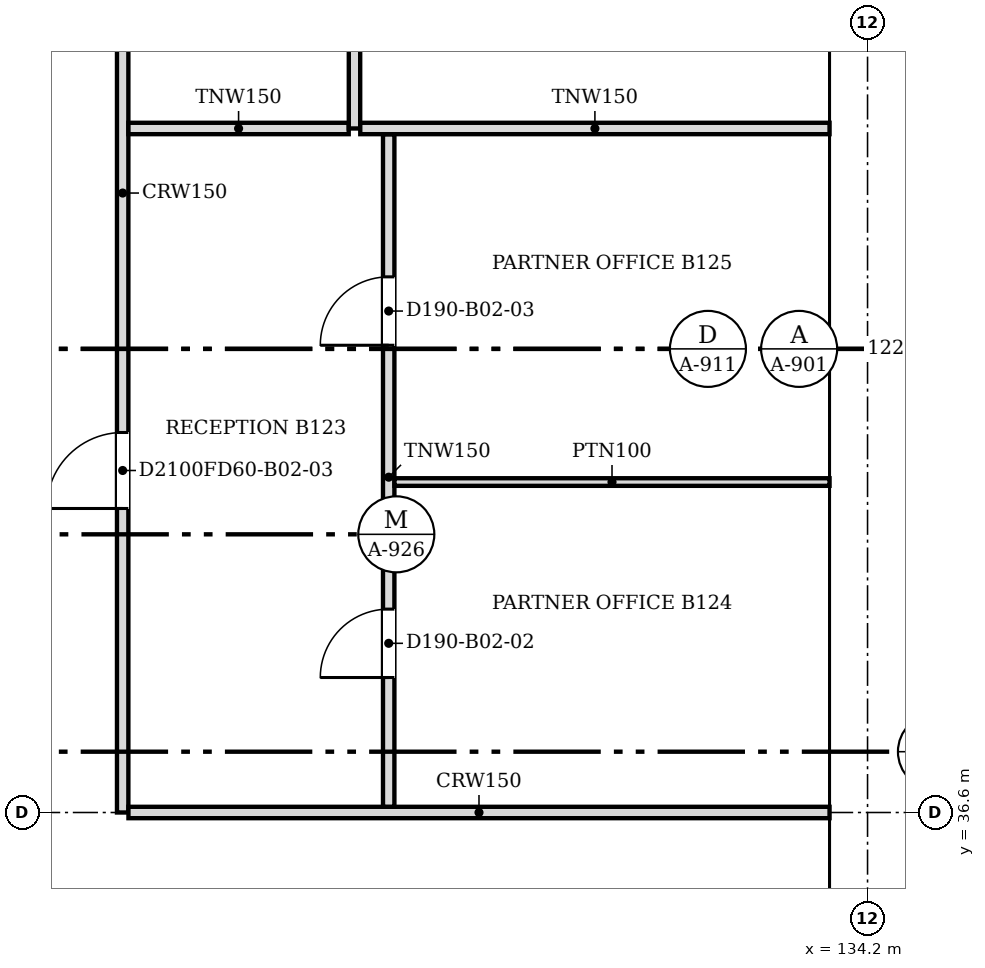
"""IFC4 building model, lengths in metres.
Left out: names, types, materials, properties, quantities, classifications, styles, units other than length and angle.
Written with IfcOpenShell. Run it as: python <this file> out.ifc"""

import sys

from ifc_helpers import new_model, si_unit, direction, frame, frame_2d, origin, place, context, subcontext, project, spatial, polyline, rectangle, outline, extrude, faceted_brep, source, transform, mapped, element, fill, save


model = new_model("IFC4")
c1 = context("Model", 3, precision=1e-05, world=origin(), true_north=direction((0.0, 1.0)))
c2 = subcontext(c1, "Body", "Model", "MODEL_VIEW")
j1 = project(units=[si_unit("LENGTHUNIT", "METRE"), si_unit("PLANEANGLEUNIT", "RADIAN")], contexts=[c1])
p1 = place(None, origin())
s1 = spatial("IfcSite", under=j1, at=p1, CompositionType="ELEMENT")
p2 = place(p1, origin())
s2 = spatial("IfcBuilding", under=s1, at=p2, CompositionType="ELEMENT")
p3 = place(p2, frame((0.0, 0.0, 21.3)))
s3 = spatial("IfcBuildingStorey", under=s2, at=p3, CompositionType="ELEMENT", Elevation=21.3)
m1 = source(origin(), c2, "Body", "Brep", [
    faceted_brep([(3.05, -0.25, 0.0), (6.1, -0.25, 4.5), (6.1, -0.25, 4.5), (3.05, -0.25, 9.0), (0.0, -0.25, 4.5), (0.0, 0.25, 4.5), (3.05, 0.25, 9.0), (6.1, 0.25, 4.5), (6.1, 0.25, 4.5), (3.05, 0.25, 0.0)], [[[0, 1, 2, 3, 4]], [[5, 6, 7, 8, 9]], [[9, 8, 1, 0]], [[7, 6, 3, 2]], [[6, 5, 4, 3]], [[5, 9, 0, 4]], [[1, 8, 7, 2]]]),
])
p4 = place(p3, frame((133.95, 33.55, -4.5), z_axis=(0.0, 0.0, 1.0), x_axis=(0.0, 1.0, 0.0)))
e1 = element("IfcWall", 1, at=p4, inside=s3, PredefinedType="SOLIDWALL", context=c2, shape_type="MappedRepresentation", body=[
    mapped(m1, transform((0.0, 0.0, 0.0), scale=1.0)),
])
m2 = source(origin(), c2, "Body", "SweptSolid", [
    extrude(outline(polyline([(3.05, 0.446), (5.798, 4.5), (3.05, 8.554), (0.302, 4.5), (3.05, 0.446)])), frame((0.0, 0.26, 0.0), z_axis=(0.0, -1.0, 0.0), x_axis=(1.0, 0.0, 0.0)), (0.0, 0.0, 1.0), 0.52),
])
p5 = place(p4, origin())
e2 = element("IfcOpeningElement", 2, at=p5, cuts=e1, PredefinedType="OPENING", context=c2, shape_type="MappedRepresentation", body=[
    mapped(m2, transform((0.0, 0.0, 0.0), scale=1.0)),
])
m3 = source(origin(), c2, "Body", "SweptSolid", [
    extrude(outline(polyline([(3.05, 0.0), (6.1, 4.5), (3.05, 9.0), (0.0, 4.5), (3.05, 0.0)])), frame((0.0, 0.25, 0.0), z_axis=(0.0, -1.0, 0.0), x_axis=(1.0, 0.0, 0.0)), (0.0, 0.0, 1.0), 0.5),
])
p6 = place(p3, frame((133.95, 39.65, -4.5), z_axis=(0.0, 0.0, 1.0), x_axis=(0.0, 1.0, 0.0)))
e3 = element("IfcWall", 3, at=p6, inside=s3, PredefinedType="SOLIDWALL", context=c2, shape_type="MappedRepresentation", body=[
    mapped(m3, transform((0.0, 0.0, 0.0), scale=1.0)),
])
p7 = place(p6, origin())
e4 = element("IfcOpeningElement", 4, at=p7, cuts=e3, PredefinedType="OPENING", context=c2, shape_type="MappedRepresentation", body=[
    mapped(m2, transform((0.0, 0.0, 0.0), scale=1.0)),
])
m4 = source(origin(), c2, "Body", "Brep", [
    faceted_brep([(3.003, -0.25, 0.0), (3.05, -0.25, 0.071), (3.05, -0.25, 8.929), (3.003, -0.25, 9.0), (0.0, -0.25, 4.5), (0.0, 0.25, 4.5), (2.957, 0.25, 8.93), (2.957, 0.25, 0.07), (3.003, 0.0, 0.0), (3.003, 0.0, 9.0)], [[[0, 1, 2, 3, 4]], [[5, 6, 7]], [[1, 0, 8]], [[9, 3, 2]], [[6, 5, 4, 3, 9]], [[5, 7, 8, 0, 4]], [[1, 8, 7, 6, 9, 2]]]),
])
p8 = place(p3, frame((133.95, 45.75, -4.5), z_axis=(0.0, 0.0, 1.0), x_axis=(0.0, 1.0, 0.0)))
e5 = element("IfcWall", 5, at=p8, inside=s3, PredefinedType="SOLIDWALL", context=c2, shape_type="MappedRepresentation", body=[
    mapped(m4, transform((0.0, 0.0, 0.0), scale=1.0)),
])
m5 = source(origin(), c2, "Body", "SweptSolid", [
    extrude(outline(polyline([(2.803, 8.25), (0.301, 4.5), (2.803, 0.75), (2.803, 8.25)])), frame((0.0, 0.26, 0.0), z_axis=(0.0, -1.0, 0.0), x_axis=(1.0, 0.0, 0.0)), (0.0, 0.0, 1.0), 0.52),
])
p9 = place(p8, origin())
e6 = element("IfcOpeningElement", 6, at=p9, cuts=e5, PredefinedType="OPENING", context=c2, shape_type="MappedRepresentation", body=[
    mapped(m5, transform((0.0, 0.0, 0.0), scale=1.0)),
])
m6 = source(origin(), c2, "Body", "SweptSolid", [
    extrude(outline(polyline([(3.05, 0.0), (6.1, 4.5), (0.0, 4.5), (3.05, 0.0)])), frame((0.0, 0.25, 0.0), z_axis=(0.0, -1.0, 0.0), x_axis=(1.0, 0.0, 0.0)), (0.0, 0.0, 1.0), 0.5),
])
p10 = place(p3, frame((133.95, 30.5, 0.0), z_axis=(0.0, 0.0, 1.0), x_axis=(0.0, 1.0, 0.0)))
e7 = element("IfcWall", 7, at=p10, inside=s3, PredefinedType="SOLIDWALL", context=c2, shape_type="MappedRepresentation", body=[
    mapped(m6, transform((0.0, 0.0, 0.0), scale=1.0)),
])
m7 = source(origin(), c2, "Body", "SweptSolid", [
    extrude(outline(polyline([(3.05, 0.446), (5.629, 4.25), (0.471, 4.25), (3.05, 0.446)])), frame((0.0, 0.26, 0.0), z_axis=(0.0, -1.0, 0.0), x_axis=(1.0, 0.0, 0.0)), (0.0, 0.0, 1.0), 0.52),
])
p11 = place(p10, origin())
e8 = element("IfcOpeningElement", 8, at=p11, cuts=e7, PredefinedType="OPENING", context=c2, shape_type="MappedRepresentation", body=[
    mapped(m7, transform((0.0, 0.0, 0.0), scale=1.0)),
])
m8 = source(origin(), c2, "Body", "Brep", [
    faceted_brep([(3.05, -0.25, 0.0), (6.1, -0.25, 4.5), (6.1, -0.25, 4.5), (0.0, -0.25, 4.5), (0.0, 0.25, 4.5), (6.1, 0.25, 4.5), (6.1, 0.25, 4.5), (3.05, 0.25, 0.0)], [[[0, 1, 2, 3]], [[4, 5, 6, 7]], [[7, 6, 1, 0]], [[5, 4, 3, 2]], [[4, 7, 0, 3]], [[1, 6, 5, 2]]]),
])
p12 = place(p3, frame((133.95, 36.6, 0.0), z_axis=(0.0, 0.0, 1.0), x_axis=(0.0, 1.0, 0.0)))
e9 = element("IfcWall", 9, at=p12, inside=s3, PredefinedType="SOLIDWALL", context=c2, shape_type="MappedRepresentation", body=[
    mapped(m8, transform((0.0, 0.0, 0.0), scale=1.0)),
])
p13 = place(p12, origin())
e10 = element("IfcOpeningElement", 10, at=p13, cuts=e9, PredefinedType="OPENING", context=c2, shape_type="MappedRepresentation", body=[
    mapped(m7, transform((0.0, 0.0, 0.0), scale=1.0)),
])
m9 = source(origin(), c2, "Body", "Brep", [
    faceted_brep([(3.05, -0.25, 0.0), (6.053, -0.25, 4.5), (0.0, -0.25, 4.5), (0.0, 0.25, 4.5), (6.007, 0.25, 4.5), (6.007, 0.25, 4.43), (3.05, 0.25, 0.0), (6.053, 0.0, 4.5)], [[[0, 1, 2]], [[3, 4, 5, 6]], [[6, 5, 7, 1, 0]], [[4, 3, 2, 1, 7]], [[3, 6, 0, 2]], [[5, 4, 7]]]),
])
p14 = place(p3, frame((133.95, 42.7, 0.0), z_axis=(0.0, 0.0, 1.0), x_axis=(0.0, 1.0, 0.0)))
e11 = element("IfcWall", 11, at=p14, inside=s3, PredefinedType="SOLIDWALL", context=c2, shape_type="MappedRepresentation", body=[
    mapped(m9, transform((0.0, 0.0, 0.0), scale=1.0)),
])
m10 = source(origin(), c2, "Body", "SweptSolid", [
    extrude(outline(polyline([(3.048, 0.448), (5.586, 4.25), (0.471, 4.25), (3.048, 0.448)])), frame((0.0, 0.26, 0.0), z_axis=(0.0, -1.0, 0.0), x_axis=(1.0, 0.0, 0.0)), (0.0, 0.0, 1.0), 0.52),
])
p15 = place(p14, origin())
e12 = element("IfcOpeningElement", 12, at=p15, cuts=e11, PredefinedType="OPENING", context=c2, shape_type="MappedRepresentation", body=[
    mapped(m10, transform((0.0, 0.0, 0.0), scale=1.0)),
])
p16 = place(p3, frame((124.4, 51.124, 0.0), z_axis=(0.0, 0.0, 1.0), x_axis=(0.0, -1.0, 0.0)))
e13 = element("IfcWall", 13, at=p16, inside=s3, PredefinedType="PARTITIONING", context=c2, shape_type="SweptSolid", body=[
    extrude(rectangle(XDim=14.524, YDim=0.15, at=frame_2d((7.262, 0.0))), origin(), (0.0, 0.0, 1.0), 3.767),
])
m11 = source(origin(), c2, "Body", "SweptSolid", [
    extrude(rectangle(XDim=1.0, YDim=2.1, at=frame_2d((0.5, 1.05))), frame((0.0, 0.085, 0.0), z_axis=(0.0, -1.0, 0.0), x_axis=(1.0, 0.0, 0.0)), (0.0, 0.0, 1.0), 0.17),
])
p17 = place(p16, frame((2.223, 0.0, 0.0)))
e14 = element("IfcOpeningElement", 14, at=p17, cuts=e13, PredefinedType="OPENING", context=c2, shape_type="MappedRepresentation", body=[
    mapped(m11, transform((0.0, 0.0, 0.0), scale=1.0)),
])
p18 = place(p16, frame((9.524, 0.0, 0.0)))
e15 = element("IfcOpeningElement", 15, at=p18, cuts=e13, PredefinedType="OPENING", context=c2, shape_type="MappedRepresentation", body=[
    mapped(m11, transform((0.0, 0.0, 0.0), scale=1.0)),
])
p19 = place(p3, frame((124.476, 36.6, 0.0), z_axis=(0.0, 0.0, 1.0), x_axis=(1.0, 0.0, 0.0)))
e16 = element("IfcWall", 16, at=p19, inside=s3, PredefinedType="PARTITIONING", context=c2, shape_type="SweptSolid", body=[
    extrude(rectangle(XDim=9.224, YDim=0.15, at=frame_2d((4.612, 0.0))), origin(), (0.0, 0.0, 1.0), 3.767),
])
p20 = place(p3, frame((127.9, 45.524, 0.0), z_axis=(0.0, 0.0, 1.0), x_axis=(0.0, -1.0, 0.0)))
e17 = element("IfcWall", 17, at=p20, inside=s3, PredefinedType="PARTITIONING", context=c2, shape_type="SweptSolid", body=[
    extrude(rectangle(XDim=8.848, YDim=0.15, at=frame_2d((4.424, 0.0))), origin(), (0.0, 0.0, 1.0), 3.767),
])
m12 = source(origin(), c2, "Body", "SweptSolid", [
    extrude(rectangle(XDim=0.9, YDim=2.1, at=frame_2d((0.45, 1.05))), frame((0.0, 0.085, 0.0), z_axis=(0.0, -1.0, 0.0), x_axis=(1.0, 0.0, 0.0)), (0.0, 0.0, 1.0), 0.17),
])
p21 = place(p20, frame((6.248, 0.0, 0.0)))
e18 = element("IfcOpeningElement", 18, at=p21, cuts=e17, PredefinedType="OPENING", context=c2, shape_type="MappedRepresentation", body=[
    mapped(m12, transform((0.0, 0.0, 0.0), scale=1.0)),
])
p22 = place(p20, frame((1.876, 0.0, 0.0)))
e19 = element("IfcOpeningElement", 19, at=p22, cuts=e17, PredefinedType="OPENING", context=c2, shape_type="MappedRepresentation", body=[
    mapped(m12, transform((0.0, 0.0, 0.0), scale=1.0)),
])
p23 = place(p3, frame((127.976, 40.948, 0.0), z_axis=(0.0, 0.0, 1.0), x_axis=(1.0, 0.0, 0.0)))
e20 = element("IfcWall", 20, at=p23, inside=s3, PredefinedType="PARTITIONING", context=c2, shape_type="SweptSolid", body=[
    extrude(rectangle(XDim=5.724, YDim=0.1, at=frame_2d((2.862, 0.0))), origin(), (0.0, 0.0, 1.0), 3.767),
])
p24 = place(p3, frame((124.476, 45.6, 0.0), z_axis=(0.0, 0.0, 1.0), x_axis=(1.0, 0.0, 0.0)))
e21 = element("IfcWall", 21, at=p24, inside=s3, PredefinedType="PARTITIONING", context=c2, shape_type="SweptSolid", body=[
    extrude(rectangle(XDim=2.898, YDim=0.15, at=frame_2d((1.449, 0.0))), origin(), (0.0, 0.0, 1.0), 3.767),
])
p25 = place(p3, frame((127.45, 45.6, 0.0), z_axis=(0.0, 0.0, 1.0), x_axis=(0.0, 1.0, 0.0)))
e22 = element("IfcWall", 22, at=p25, inside=s3, PredefinedType="PARTITIONING", context=c2, shape_type="SweptSolid", body=[
    extrude(rectangle(XDim=5.6, YDim=0.15, at=frame_2d((2.8, 0.0))), origin(), (0.0, 0.0, 1.0), 3.767),
])
p26 = place(p3, frame((127.526, 45.6, 0.0), z_axis=(0.0, 0.0, 1.0), x_axis=(1.0, 0.0, 0.0)))
e23 = element("IfcWall", 23, at=p26, inside=s3, PredefinedType="PARTITIONING", context=c2, shape_type="SweptSolid", body=[
    extrude(rectangle(XDim=6.174, YDim=0.15, at=frame_2d((3.087, 0.0))), origin(), (0.0, 0.0, 1.0), 3.767),
])
m13 = source(origin(), c2, "Body", "SweptSolid", [
    extrude(rectangle(XDim=0.9, YDim=2.1, at=frame_2d((0.45, 1.05))), frame((0.0, 0.025, 0.0), z_axis=(0.0, -1.0, 0.0), x_axis=(1.0, 0.0, 0.0)), (0.0, 0.0, 1.0), 0.05),
])
p27 = place(p21, origin())
e24 = element("IfcDoor", 24, at=p27, inside=s3, OperationType="SINGLE_SWING_RIGHT", PredefinedType="DOOR", context=c2, shape_type="MappedRepresentation", body=[
    mapped(m13, transform((0.0, 0.0, 0.0), scale=1.0)),
])
fill(e18, e24)
p28 = place(p22, origin())
e25 = element("IfcDoor", 25, at=p28, inside=s3, OperationType="SINGLE_SWING_RIGHT", PredefinedType="DOOR", context=c2, shape_type="MappedRepresentation", body=[
    mapped(m13, transform((0.0, 0.0, 0.0), scale=1.0)),
])
fill(e19, e25)
m14 = source(origin(), c2, "Body", "SweptSolid", [
    extrude(rectangle(XDim=1.0, YDim=2.1, at=frame_2d((0.5, 1.05))), frame((0.0, 0.025, 0.0), z_axis=(0.0, -1.0, 0.0), x_axis=(1.0, 0.0, 0.0)), (0.0, 0.0, 1.0), 0.05),
])
p29 = place(p18, origin())
e26 = element("IfcDoor", 26, at=p29, inside=s3, OperationType="SINGLE_SWING_RIGHT", PredefinedType="DOOR", context=c2, shape_type="MappedRepresentation", body=[
    mapped(m14, transform((0.0, 0.0, 0.0), scale=1.0)),
])
fill(e15, e26)
save(model, sys.argv[1])
